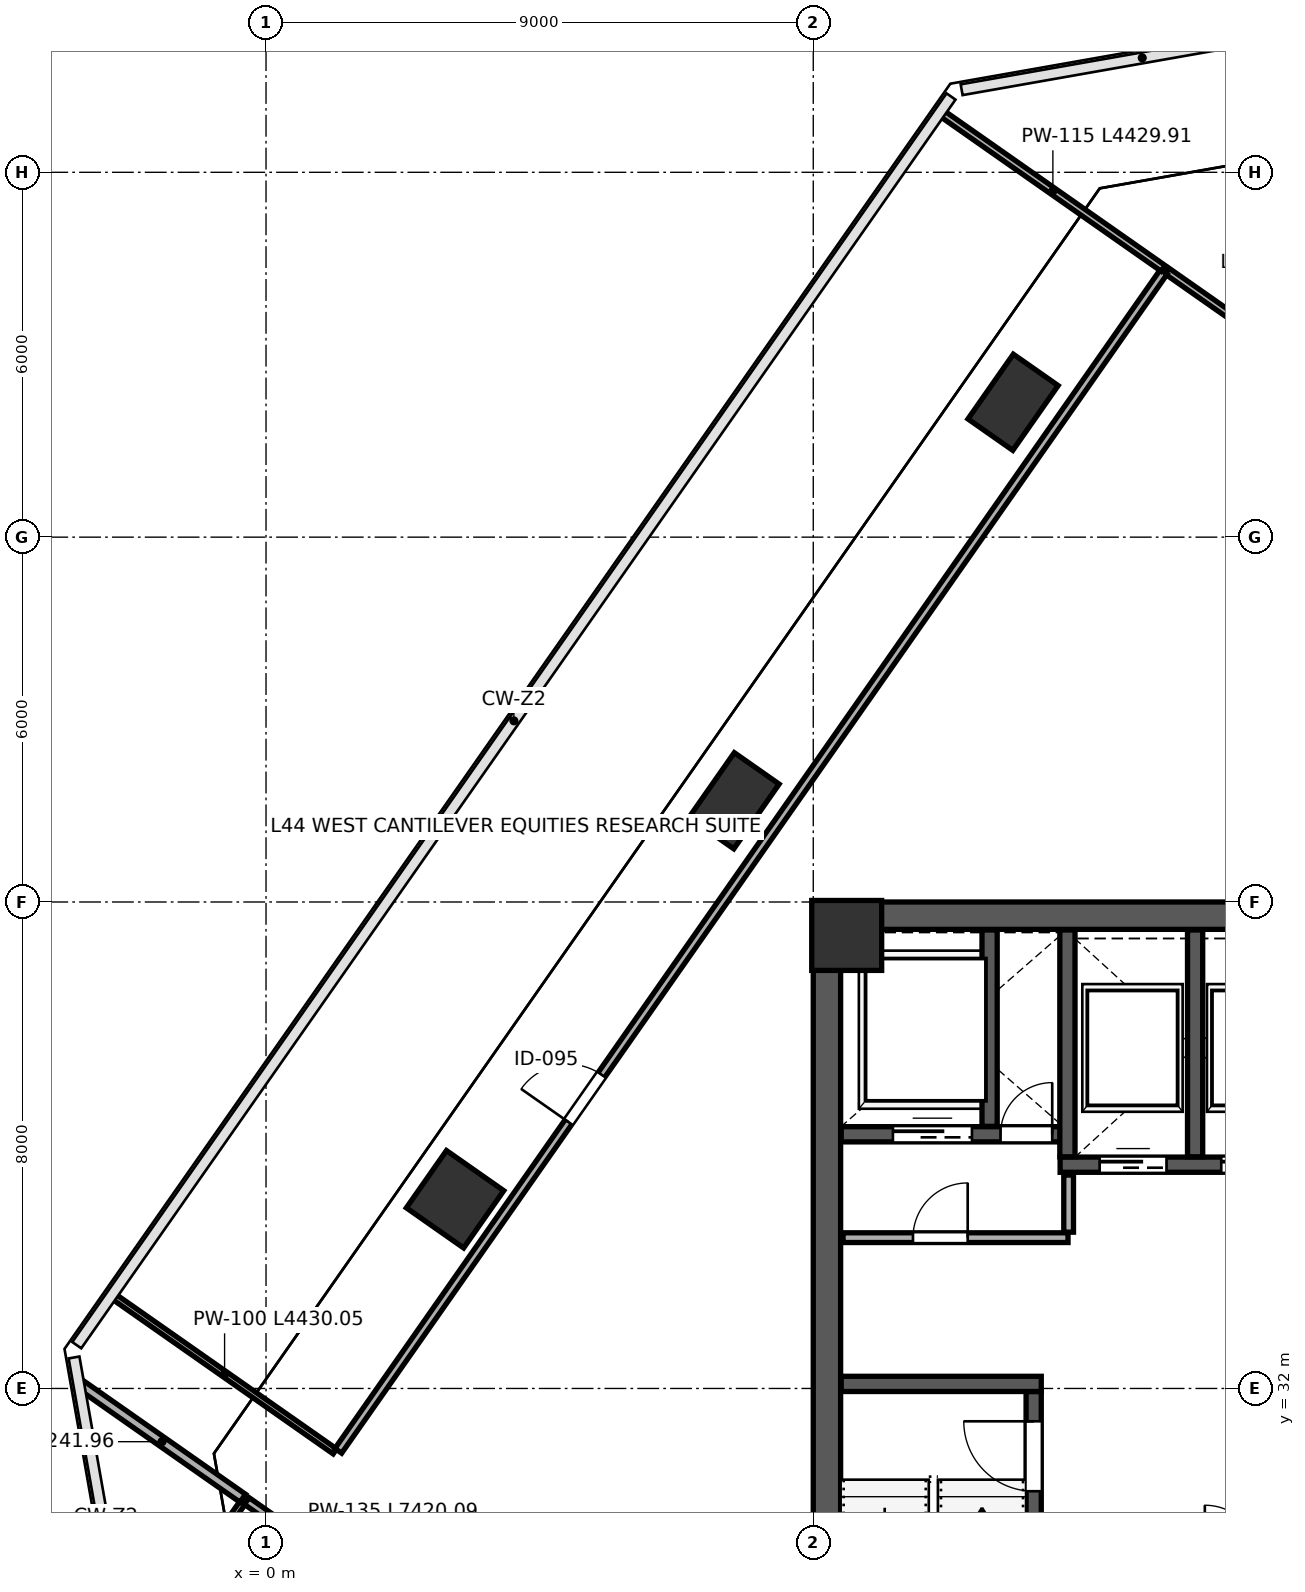
"""IFC4 building model, lengths in metres.
Left out: names, types, materials, properties, quantities, classifications, styles, units other than length and angle.
Written with IfcOpenShell. Run it as: python <this file> out.ifc"""

import sys

from ifc_helpers import new_model, si_unit, direction, frame, frame_2d, origin, origin_2d, place, context, subcontext, project, spatial, rectangle, extrude, clip, halfspace, source, transform, mapped, element, fill, save


model = new_model("IFC4")
c1 = context("Model", 3, precision=1e-05, world=origin(), true_north=direction((0.0, 1.0)))
c2 = subcontext(c1, "Body", "Model", "MODEL_VIEW")
j1 = project(units=[si_unit("LENGTHUNIT", "METRE"), si_unit("PLANEANGLEUNIT", "RADIAN")], contexts=[c1])
p1 = place(None, origin())
s1 = spatial("IfcSite", under=j1, at=p1, CompositionType="ELEMENT")
p2 = place(p1, origin())
s2 = spatial("IfcBuilding", under=s1, at=p2, CompositionType="ELEMENT")
p3 = place(p2, frame((0.0, 0.0, 196.0)))
s3 = spatial("IfcBuildingStorey", under=s2, at=p3, CompositionType="ELEMENT", Elevation=196.0)
m1 = source(origin(), c2, "Body", "SweptSolid", [
    extrude(rectangle(XDim=1.15, YDim=1.15, at=origin_2d()), origin(), (0.0, 0.0, 1.0), 4.198),
])
p4 = place(p3, frame((9.55, 39.45, 0.001), z_axis=(0.0, 0.0, 1.0), x_axis=(1.0, 0.0, 0.0)))
e1 = element("IfcColumn", 1, at=p4, inside=s3, PredefinedType="COLUMN", context=c2, shape_type="MappedRepresentation", body=[
    mapped(m1, transform((0.0, 0.0, 0.0), scale=1.0)),
])
p5 = place(p3, frame((3.109, 35.112, 0.0), z_axis=(0.017126130611, 0.094888020954, 0.995340624676), x_axis=(0.704724339215, -0.707322396725, 0.055304907645)))
e2 = element("IfcColumn", 2, at=p5, inside=s3, PredefinedType="COLUMN", context=c2, shape_type="Clipping", body=[
    clip(clip(extrude(rectangle(XDim=1.15, YDim=1.15, at=origin_2d()), origin(), (0.0, 0.0, 1.0), 4.22), halfspace(frame((0.0, 0.0, 0.078), z_axis=(0.0, 0.0, -1.0), x_axis=(1.0, 0.0, 0.0)), False)), halfspace(frame((0.0, 0.0, 4.141), z_axis=(0.0, 0.0, 1.0), x_axis=(1.0, 0.0, 0.0)), False)),
])
p6 = place(p3, frame((7.697, 41.665, 0.0), z_axis=(0.050785311162, 0.070879385247, 0.996191229091), x_axis=(0.333075911706, -0.94157268178, 0.050013217923)))
e3 = element("IfcColumn", 3, at=p6, inside=s3, PredefinedType="PILASTER", context=c2, shape_type="Clipping", body=[
    clip(clip(extrude(rectangle(XDim=0.9, YDim=1.3, at=origin_2d()), origin(), (0.0, 0.0, 1.0), 4.216), halfspace(frame((0.0, 0.0, 0.07), z_axis=(0.0, 0.0, -1.0), x_axis=(1.0, 0.0, 0.0)), False)), halfspace(frame((0.0, 0.0, 4.146), z_axis=(0.0, 0.0, 1.0), x_axis=(1.0, 0.0, 0.0)), False)),
])
p7 = place(p3, frame((12.286, 48.218, 0.0), z_axis=(0.084357793633, 0.0466918652, 0.995340962875), x_axis=(-0.102807659943, -0.99316271262, 0.055302905149)))
e4 = element("IfcColumn", 4, at=p7, inside=s3, PredefinedType="PILASTER", context=c2, shape_type="Clipping", body=[
    clip(clip(extrude(rectangle(XDim=0.9, YDim=1.3, at=origin_2d()), origin(), (0.0, 0.0, 1.0), 4.22), halfspace(frame((0.0, 0.0, 0.077), z_axis=(0.0, 0.0, -1.0), x_axis=(1.0, 0.0, 0.0)), False)), halfspace(frame((0.0, 0.0, 4.142), z_axis=(0.0, 0.0, 1.0), x_axis=(1.0, 0.0, 0.0)), False)),
])
p8 = place(p3, frame((9.225, 24.45, 0.0), z_axis=(0.0, 0.0, 1.0), x_axis=(0.0, 1.0, 0.0)))
e5 = element("IfcWall", 5, at=p8, inside=s3, PredefinedType="SHEAR", context=c2, shape_type="SweptSolid", body=[
    extrude(rectangle(XDim=15.1, YDim=0.45, at=frame_2d((7.55, 0.0))), origin(), (0.0, 0.0, 1.0), 3.96),
])
p9 = place(p3, frame((9.0, 39.775, 0.0), z_axis=(0.0, 0.0, 1.0), x_axis=(1.0, 0.0, 0.0)))
e6 = element("IfcWall", 6, at=p9, inside=s3, PredefinedType="SHEAR", context=c2, shape_type="SweptSolid", body=[
    extrude(rectangle(XDim=18.0, YDim=0.45, at=frame_2d((9.0, 0.0))), origin(), (0.0, 0.0, 1.0), 3.96),
])
p10 = place(p3, frame((12.625, 24.46, 0.0), z_axis=(0.0, 0.0, 1.0), x_axis=(0.0, 1.0, 0.0)))
e7 = element("IfcWall", 7, at=p10, inside=s3, PredefinedType="SHEAR", context=c2, shape_type="SweptSolid", body=[
    extrude(rectangle(XDim=7.49, YDim=0.25, at=frame_2d((3.745, 0.0))), origin(), (0.0, 0.0, 1.0), 3.96),
])
p11 = place(p10, frame((5.85, 0.0, 0.0)))
e8 = element("IfcOpeningElement", 8, at=p11, cuts=e7, PredefinedType="OPENING", context=c2, shape_type="SweptSolid", body=[
    extrude(rectangle(XDim=1.15, YDim=2.2, at=frame_2d((0.575, 1.1))), frame((0.0, 0.135, 0.0), z_axis=(0.0, -1.0, 0.0), x_axis=(1.0, 0.0, 0.0)), (0.0, 0.0, 1.0), 0.27),
])
p12 = place(p3, frame((9.46, 32.075, 0.0), z_axis=(0.0, 0.0, 1.0), x_axis=(1.0, 0.0, 0.0)))
e9 = element("IfcWall", 9, at=p12, inside=s3, PredefinedType="SHEAR", context=c2, shape_type="SweptSolid", body=[
    extrude(rectangle(XDim=3.29, YDim=0.25, at=frame_2d((1.645, 0.0))), origin(), (0.0, 0.0, 1.0), 3.96),
])
p13 = place(p3, frame((9.46, 36.18, 0.0), z_axis=(0.0, 0.0, 1.0), x_axis=(1.0, 0.0, 0.0)))
e10 = element("IfcWall", 10, at=p13, inside=s3, PredefinedType="SHEAR", context=c2, shape_type="SweptSolid", body=[
    extrude(rectangle(XDim=3.79, YDim=0.25, at=frame_2d((1.895, 0.0))), origin(), (0.0, 0.0, 1.0), 3.96),
])
p14 = place(p13, frame((2.62, 0.0, 0.0)))
e11 = element("IfcOpeningElement", 11, at=p14, cuts=e10, PredefinedType="OPENING", context=c2, shape_type="SweptSolid", body=[
    extrude(rectangle(XDim=0.85, YDim=2.1, at=frame_2d((0.425, 1.05))), frame((0.0, 0.135, 0.0), z_axis=(0.0, -1.0, 0.0), x_axis=(1.0, 0.0, 0.0)), (0.0, 0.0, 1.0), 0.27),
])
p15 = place(p13, frame((0.85, 0.0, 0.0)))
e12 = element("IfcOpeningElement", 12, at=p15, cuts=e10, PredefinedType="OPENING", context=c2, shape_type="SweptSolid", body=[
    extrude(rectangle(XDim=1.3, YDim=2.25, at=frame_2d((0.65, 1.125))), frame((0.0, 0.135, 0.0), z_axis=(0.0, -1.0, 0.0), x_axis=(1.0, 0.0, 0.0)), (0.0, 0.0, 1.0), 0.27),
])
p16 = place(p3, frame((11.9, 36.31, 0.0), z_axis=(0.0, 0.0, 1.0), x_axis=(0.0, 1.0, 0.0)))
e13 = element("IfcWall", 13, at=p16, inside=s3, PredefinedType="SHEAR", context=c2, shape_type="SweptSolid", body=[
    extrude(rectangle(XDim=3.23, YDim=0.25, at=frame_2d((1.615, 0.0))), origin(), (0.0, 0.0, 1.0), 3.96),
])
p17 = place(p3, frame((13.06, 35.68, 0.0), z_axis=(0.0, 0.0, 1.0), x_axis=(1.0, 0.0, 0.0)))
e14 = element("IfcWall", 14, at=p17, inside=s3, PredefinedType="SHEAR", context=c2, shape_type="SweptSolid", body=[
    extrude(rectangle(XDim=4.25, YDim=0.25, at=frame_2d((2.125, 0.0))), origin(), (0.0, 0.0, 1.0), 3.96),
])
p18 = place(p17, frame((0.65, 0.0, 0.0)))
e15 = element("IfcOpeningElement", 15, at=p18, cuts=e14, PredefinedType="OPENING", context=c2, shape_type="SweptSolid", body=[
    extrude(rectangle(XDim=1.1, YDim=2.2, at=frame_2d((0.55, 1.1))), frame((0.0, 0.135, 0.0), z_axis=(0.0, -1.0, 0.0), x_axis=(1.0, 0.0, 0.0)), (0.0, 0.0, 1.0), 0.27),
])
p19 = place(p17, frame((2.65, 0.0, 0.0)))
e16 = element("IfcOpeningElement", 16, at=p19, cuts=e14, PredefinedType="OPENING", context=c2, shape_type="SweptSolid", body=[
    extrude(rectangle(XDim=1.1, YDim=2.2, at=frame_2d((0.55, 1.1))), frame((0.0, 0.135, 0.0), z_axis=(0.0, -1.0, 0.0), x_axis=(1.0, 0.0, 0.0)), (0.0, 0.0, 1.0), 0.27),
])
for number, where, z_axis, x_axis in (
    (17, (13.18, 35.81, 0.0), (0.0, 0.0, 1.0), (0.0, 1.0, 0.0)),
    (18, (15.28, 35.81, 0.0), (0.0, 0.0, 1.0), (0.0, 1.0, 0.0)),
):
    element("IfcWall", number, at=place(p3, frame(where, z_axis=z_axis, x_axis=x_axis)), inside=s3, PredefinedType="SHEAR", context=c2, shape_type="SweptSolid", body=[
        extrude(rectangle(XDim=3.73, YDim=0.25, at=frame_2d((1.865, 0.0))), origin(), (0.0, 0.0, 1.0), 3.96),
    ])
p20 = place(p3, frame((9.49, 34.48, 0.0), z_axis=(0.0, 0.0, 1.0), x_axis=(1.0, 0.0, 0.0)))
e19 = element("IfcWall", 19, at=p20, inside=s3, PredefinedType="PARTITIONING", context=c2, shape_type="SweptSolid", body=[
    extrude(rectangle(XDim=3.7, YDim=0.16, at=frame_2d((1.85, 0.0))), origin(), (0.0, 0.0, 1.0), 3.96),
])
p21 = place(p20, frame((1.15, 0.0, 0.0)))
e20 = element("IfcOpeningElement", 20, at=p21, cuts=e19, PredefinedType="OPENING", context=c2, shape_type="SweptSolid", body=[
    extrude(rectangle(XDim=0.9, YDim=2.15, at=frame_2d((0.45, 1.075))), frame((0.0, 0.09, 0.0), z_axis=(0.0, -1.0, 0.0), x_axis=(1.0, 0.0, 0.0)), (0.0, 0.0, 1.0), 0.18),
])
p22 = place(p3, frame((13.2, 34.57, 0.0), z_axis=(0.0, 0.0, 1.0), x_axis=(0.0, 1.0, 0.0)))
e21 = element("IfcWall", 21, at=p22, inside=s3, PredefinedType="PARTITIONING", context=c2, shape_type="SweptSolid", body=[
    extrude(rectangle(XDim=0.94, YDim=0.16, at=frame_2d((0.47, 0.0))), origin(), (0.0, 0.0, 1.0), 3.96),
])
p23 = place(p3, frame((-2.232, 27.484, 0.0), z_axis=(0.0, 0.0, 1.0), x_axis=(0.573583631645, 0.819147006043, 0.0)))
e22 = element("IfcWall", 22, at=p23, inside=s3, PredefinedType="PARTITIONING", context=c2, shape_type="SweptSolid", body=[
    extrude(rectangle(XDim=3.242, YDim=0.1, at=frame_2d((1.621, 0.0))), origin(), (0.0, 0.0, 1.0), 3.96),
])
p24 = place(p3, frame((-3.038, 32.055, 0.0), z_axis=(0.0, 0.0, 1.0), x_axis=(0.819122229171, -0.573619014397, 0.0)))
e23 = element("IfcWall", 23, at=p24, inside=s3, PredefinedType="PARTITIONING", context=c2, shape_type="SweptSolid", body=[
    extrude(rectangle(XDim=3.242, YDim=0.16, at=frame_2d((1.621, 0.0))), origin(), (0.0, 0.0, 1.0), 3.96),
])
p25 = place(p3, frame((-0.317, 30.149, 0.0), z_axis=(0.0, 0.0, 1.0), x_axis=(0.819142256539, -0.573590414454, 0.0)))
e24 = element("IfcWall", 24, at=p25, inside=s3, PredefinedType="PARTITIONING", context=c2, shape_type="SweptSolid", body=[
    extrude(rectangle(XDim=7.42, YDim=0.135, at=frame_2d((3.71, 0.0))), origin(), (0.0, 0.0, 1.0), 3.96),
])
p26 = place(p25, frame((2.9, 0.0, 0.0)))
e25 = element("IfcOpeningElement", 25, at=p26, cuts=e24, PredefinedType="OPENING", context=c2, shape_type="SweptSolid", body=[
    extrude(rectangle(XDim=0.9, YDim=2.15, at=frame_2d((0.45, 1.075))), frame((0.0, 0.078, 0.0), z_axis=(0.0, -1.0, 0.0), x_axis=(1.0, 0.0, 0.0)), (0.0, 0.0, 1.0), 0.155),
])
p27 = place(p25, frame((5.0, 0.0, 0.0)))
e26 = element("IfcOpeningElement", 26, at=p27, cuts=e24, PredefinedType="OPENING", context=c2, shape_type="SweptSolid", body=[
    extrude(rectangle(XDim=0.95, YDim=2.15, at=frame_2d((0.475, 1.075))), frame((0.0, 0.078, 0.0), z_axis=(0.0, -1.0, 0.0), x_axis=(1.0, 0.0, 0.0)), (0.0, 0.0, 1.0), 0.155),
])
p28 = place(p3, frame((14.821, 50.374, 0.0), z_axis=(0.0, 0.0, 1.0), x_axis=(0.819153719849, -0.573574043396, 0.0)))
e27 = element("IfcWall", 27, at=p28, inside=s3, PredefinedType="PARTITIONING", context=c2, shape_type="SweptSolid", body=[
    extrude(rectangle(XDim=26.99, YDim=0.115, at=frame_2d((13.495, 0.0))), origin(), (0.0, 0.0, 1.0), 3.96),
])
p29 = place(p28, frame((18.8, 0.0, 0.0)))
e28 = element("IfcOpeningElement", 28, at=p29, cuts=e27, PredefinedType="OPENING", context=c2, shape_type="SweptSolid", body=[
    extrude(rectangle(XDim=0.95, YDim=2.15, at=frame_2d((0.475, 1.075))), frame((0.0, 0.067, 0.0), z_axis=(0.0, -1.0, 0.0), x_axis=(1.0, 0.0, 0.0)), (0.0, 0.0, 1.0), 0.135),
])
p30 = place(p3, frame((-2.496, 33.506, 0.0), z_axis=(0.0, 0.0, 1.0), x_axis=(0.819130930641, -0.573606588584, 0.0)))
e29 = element("IfcWall", 29, at=p30, inside=s3, PredefinedType="PARTITIONING", context=c2, shape_type="SweptSolid", body=[
    extrude(rectangle(XDim=4.43, YDim=0.1, at=frame_2d((2.215, 0.0))), origin(), (0.0, 0.0, 1.0), 3.96),
])
p31 = place(p3, frame((1.189, 30.975, 0.0), z_axis=(0.0, 0.0, 1.0), x_axis=(0.573571020786, 0.819155836282, 0.0)))
e30 = element("IfcWall", 30, at=p31, inside=s3, PredefinedType="PARTITIONING", context=c2, shape_type="SweptSolid", body=[
    extrude(rectangle(XDim=23.67, YDim=0.135, at=frame_2d((11.835, 0.0))), origin(), (0.0, 0.0, 1.0), 3.96),
])
p32 = place(p31, frame((6.6, 0.0, 0.0)))
e31 = element("IfcOpeningElement", 31, at=p32, cuts=e30, PredefinedType="OPENING", context=c2, shape_type="SweptSolid", body=[
    extrude(rectangle(XDim=0.95, YDim=2.15, at=frame_2d((0.475, 1.075))), frame((0.0, 0.078, 0.0), z_axis=(0.0, -1.0, 0.0), x_axis=(1.0, 0.0, 0.0)), (0.0, 0.0, 1.0), 0.155),
])
p33 = place(p3, frame((11.127, 52.961, 0.0), z_axis=(0.0, 0.0, 1.0), x_axis=(0.819130930641, -0.573606588584, 0.0)))
e32 = element("IfcWall", 32, at=p33, inside=s3, PredefinedType="PARTITIONING", context=c2, shape_type="SweptSolid", body=[
    extrude(rectangle(XDim=4.43, YDim=0.115, at=frame_2d((2.215, 0.0))), origin(), (0.0, 0.0, 1.0), 3.96),
])
m2 = source(origin(), c2, "Body", "SweptSolid", [
    extrude(rectangle(XDim=1.15, YDim=2.2, at=frame_2d((0.575, 1.1))), frame((0.0, 0.025, 0.0), z_axis=(0.0, -1.0, 0.0), x_axis=(1.0, 0.0, 0.0)), (0.0, 0.0, 1.0), 0.05),
])
p34 = place(p11, origin())
e33 = element("IfcDoor", 33, at=p34, inside=s3, OperationType="SINGLE_SWING_RIGHT", PredefinedType="DOOR", context=c2, shape_type="MappedRepresentation", body=[
    mapped(m2, transform((0.0, 0.0, 0.0), scale=1.0)),
])
fill(e8, e33)
m3 = source(origin(), c2, "Body", "SweptSolid", [
    extrude(rectangle(XDim=0.85, YDim=2.1, at=frame_2d((0.425, 1.05))), frame((0.0, 0.025, 0.0), z_axis=(0.0, -1.0, 0.0), x_axis=(1.0, 0.0, 0.0)), (0.0, 0.0, 1.0), 0.05),
])
p35 = place(p14, origin())
e34 = element("IfcDoor", 34, at=p35, inside=s3, OperationType="SINGLE_SWING_RIGHT", PredefinedType="DOOR", context=c2, shape_type="MappedRepresentation", body=[
    mapped(m3, transform((0.0, 0.0, 0.0), scale=1.0)),
])
fill(e11, e34)
m4 = source(origin(), c2, "Body", "SweptSolid", [
    extrude(rectangle(XDim=1.1, YDim=2.2, at=frame_2d((0.55, 1.1))), frame((0.0, 0.025, 0.0), z_axis=(0.0, -1.0, 0.0), x_axis=(1.0, 0.0, 0.0)), (0.0, 0.0, 1.0), 0.05),
])
p36 = place(p18, origin())
e35 = element("IfcDoor", 35, at=p36, inside=s3, OperationType="SLIDING_TO_LEFT", PredefinedType="DOOR", context=c2, shape_type="MappedRepresentation", body=[
    mapped(m4, transform((0.0, 0.0, 0.0), scale=1.0)),
])
fill(e15, e35)
p37 = place(p19, origin())
e36 = element("IfcDoor", 36, at=p37, inside=s3, OperationType="SLIDING_TO_RIGHT", PredefinedType="DOOR", context=c2, shape_type="MappedRepresentation", body=[
    mapped(m4, transform((0.0, 0.0, 0.0), scale=1.0)),
])
fill(e16, e36)
m5 = source(origin(), c2, "Body", "SweptSolid", [
    extrude(rectangle(XDim=1.3, YDim=2.25, at=frame_2d((0.65, 1.125))), frame((0.0, 0.025, 0.0), z_axis=(0.0, -1.0, 0.0), x_axis=(1.0, 0.0, 0.0)), (0.0, 0.0, 1.0), 0.05),
])
p38 = place(p15, origin())
e37 = element("IfcDoor", 37, at=p38, inside=s3, OperationType="SLIDING_TO_LEFT", PredefinedType="DOOR", context=c2, shape_type="MappedRepresentation", body=[
    mapped(m5, transform((0.0, 0.0, 0.0), scale=1.0)),
])
fill(e12, e37)
m6 = source(origin(), c2, "Body", "SweptSolid", [
    extrude(rectangle(XDim=0.9, YDim=2.15, at=frame_2d((0.45, 1.075))), frame((0.0, 0.025, 0.0), z_axis=(0.0, -1.0, 0.0), x_axis=(1.0, 0.0, 0.0)), (0.0, 0.0, 1.0), 0.05),
])
p39 = place(p21, origin())
e38 = element("IfcDoor", 38, at=p39, inside=s3, OperationType="SINGLE_SWING_RIGHT", PredefinedType="DOOR", context=c2, shape_type="MappedRepresentation", body=[
    mapped(m6, transform((0.0, 0.0, 0.0), scale=1.0)),
])
fill(e20, e38)
m7 = source(origin(), c2, "Body", "SweptSolid", [
    extrude(rectangle(XDim=0.95, YDim=2.15, at=frame_2d((0.475, 1.075))), frame((0.0, 0.025, 0.0), z_axis=(0.0, -1.0, 0.0), x_axis=(1.0, 0.0, 0.0)), (0.0, 0.0, 1.0), 0.05),
])
p40 = place(p32, origin())
e39 = element("IfcDoor", 39, at=p40, inside=s3, OperationType="SINGLE_SWING_LEFT", PredefinedType="DOOR", context=c2, shape_type="MappedRepresentation", body=[
    mapped(m7, transform((0.0, 0.0, 0.0), scale=1.0)),
])
fill(e31, e39)
save(model, sys.argv[1])
